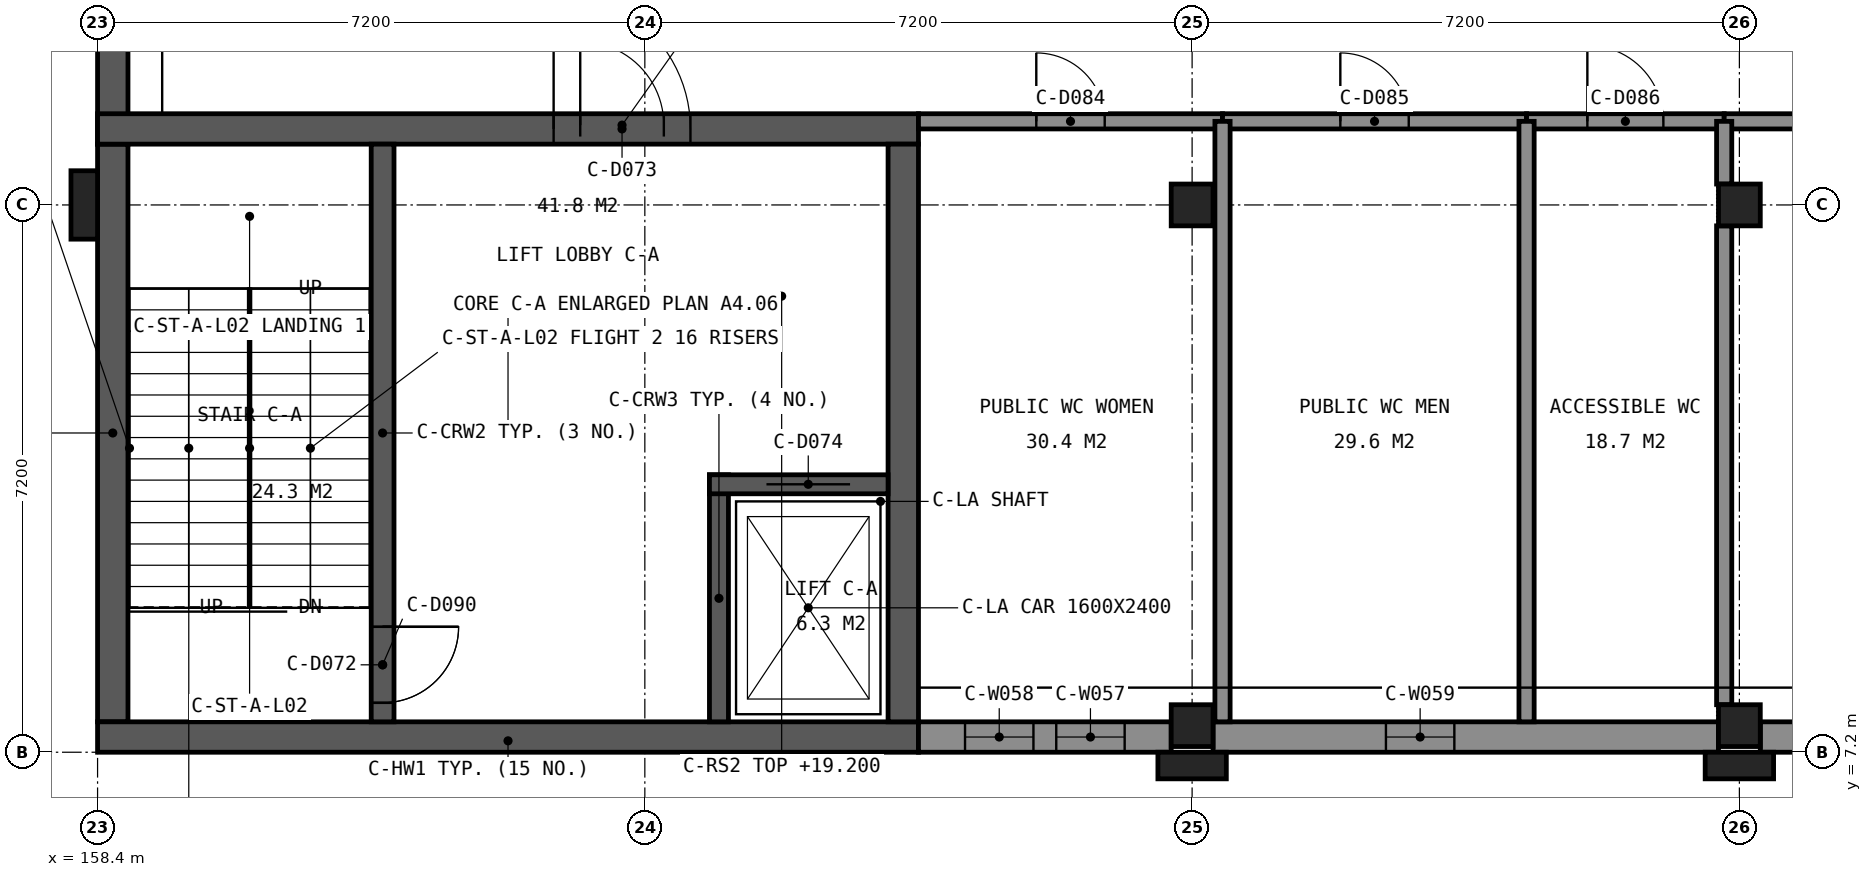
"""IFC4 building model, lengths in metres.
Left out: names, types, materials, properties, quantities, classifications, styles, units other than length and angle.
Written with IfcOpenShell. Run it as: python <this file> out.ifc"""

import sys

from ifc_helpers import new_model, si_unit, direction, frame, frame_2d, origin, origin_2d, place, context, subcontext, project, spatial, polyline, rectangle, outline, extrude, element, fill, save


model = new_model("IFC4")
c1 = context("Model", 3, precision=1e-05, world=origin(), true_north=direction((0.0, 1.0)))
c2 = subcontext(c1, "Body", "Model", "MODEL_VIEW")
j1 = project(units=[si_unit("LENGTHUNIT", "METRE"), si_unit("PLANEANGLEUNIT", "RADIAN")], contexts=[c1])
p1 = place(None, origin())
s1 = spatial("IfcSite", under=j1, at=p1, CompositionType="ELEMENT")
p2 = place(p1, origin())
s2 = spatial("IfcBuilding", under=s1, at=p2, CompositionType="ELEMENT")
p3 = place(p2, frame((0.0, 0.0, 14.4)))
s3 = spatial("IfcBuildingStorey", under=s2, at=p3, CompositionType="ELEMENT", Elevation=14.4)
for number, where, z_axis, x_axis in (
    (1, (172.8, 14.4, 0.0), (0.0, 0.0, 1.0), (1.0, 0.0, 0.0)),
    (2, (180.0, 14.4, 0.0), (0.0, 0.0, 1.0), (1.0, 0.0, 0.0)),
    (3, (172.8, 7.55, 0.0), (0.0, 0.0, 1.0), (1.0, 0.0, 0.0)),
    (4, (180.0, 7.55, 0.0), (0.0, 0.0, 1.0), (1.0, 0.0, 0.0)),
):
    element("IfcColumn", number, at=place(p3, frame(where, z_axis=z_axis, x_axis=x_axis)), inside=s3, PredefinedType="COLUMN", context=c2, shape_type="SweptSolid", body=[
        extrude(rectangle(XDim=0.55, YDim=0.55, at=origin_2d()), origin(), (0.0, 0.0, 1.0), 4.8),
    ])
p4 = place(p3, frame((158.6, 15.2, 0.0), z_axis=(0.0, 0.0, 1.0), x_axis=(0.0, 1.0, 0.0)))
e5 = element("IfcWall", 5, at=p4, inside=s3, PredefinedType="SHEAR", context=c2, shape_type="SweptSolid", body=[
    extrude(rectangle(XDim=6.125, YDim=0.4, at=frame_2d((3.062, 0.0))), origin(), (0.0, 0.0, 1.0), 3.7),
])
p5 = place(p4, frame((2.012, 0.0, 1.8)))
e6 = element("IfcOpeningElement", 6, at=p5, cuts=e5, PredefinedType="OPENING", context=c2, shape_type="SweptSolid", body=[
    extrude(rectangle(XDim=0.9, YDim=1.2, at=frame_2d((0.45, 0.6))), frame((0.0, 0.21, 0.0), z_axis=(0.0, -1.0, 0.0), x_axis=(1.0, 0.0, 0.0)), (0.0, 0.0, 1.0), 0.42),
])
p6 = place(p3, frame((158.6, 7.6, 0.0), z_axis=(0.0, 0.0, 1.0), x_axis=(0.0, 1.0, 0.0)))
e7 = element("IfcWall", 7, at=p6, inside=s3, PredefinedType="SHEAR", context=c2, shape_type="SweptSolid", body=[
    extrude(rectangle(XDim=7.6, YDim=0.4, at=frame_2d((3.8, 0.0))), origin(), (0.0, 0.0, 1.0), 4.5),
])
p7 = place(p3, frame((169.2, 7.4, 0.0), z_axis=(0.0, 0.0, 1.0), x_axis=(-1.0, 0.0, 0.0)))
e8 = element("IfcWall", 8, at=p7, inside=s3, PredefinedType="SHEAR", context=c2, shape_type="SweptSolid", body=[
    extrude(rectangle(XDim=10.8, YDim=0.4, at=frame_2d((5.4, 0.0))), origin(), (0.0, 0.0, 1.0), 4.5),
])
p8 = place(p3, frame((172.525, 7.4, 0.0), z_axis=(0.0, 0.0, 1.0), x_axis=(-1.0, 0.0, 0.0)))
e9 = element("IfcWall", 9, at=p8, inside=s3, PredefinedType="SOLIDWALL", context=c2, shape_type="SweptSolid", body=[
    extrude(rectangle(XDim=3.325, YDim=0.4, at=frame_2d((1.663, 0.0))), origin(), (0.0, 0.0, 1.0), 3.7),
])
p9 = place(p8, frame((0.613, 0.0, 1.8)))
e10 = element("IfcOpeningElement", 10, at=p9, cuts=e9, PredefinedType="OPENING", context=c2, shape_type="SweptSolid", body=[
    extrude(rectangle(XDim=0.9, YDim=1.2, at=frame_2d((0.45, 0.6))), frame((0.0, 0.21, 0.0), z_axis=(0.0, -1.0, 0.0), x_axis=(1.0, 0.0, 0.0)), (0.0, 0.0, 1.0), 0.42),
])
p10 = place(p8, frame((1.812, 0.0, 1.8)))
e11 = element("IfcOpeningElement", 11, at=p10, cuts=e9, PredefinedType="OPENING", context=c2, shape_type="SweptSolid", body=[
    extrude(rectangle(XDim=0.9, YDim=1.2, at=frame_2d((0.45, 0.6))), frame((0.0, 0.21, 0.0), z_axis=(0.0, -1.0, 0.0), x_axis=(1.0, 0.0, 0.0)), (0.0, 0.0, 1.0), 0.42),
])
p11 = place(p3, frame((179.725, 7.4, 0.0), z_axis=(0.0, 0.0, 1.0), x_axis=(-1.0, 0.0, 0.0)))
e12 = element("IfcWall", 12, at=p11, inside=s3, PredefinedType="SOLIDWALL", context=c2, shape_type="SweptSolid", body=[
    extrude(rectangle(XDim=6.65, YDim=0.4, at=frame_2d((3.325, 0.0))), origin(), (0.0, 0.0, 1.0), 3.7),
])
p12 = place(p11, frame((3.475, 0.0, 1.8)))
e13 = element("IfcOpeningElement", 13, at=p12, cuts=e12, PredefinedType="OPENING", context=c2, shape_type="SweptSolid", body=[
    extrude(rectangle(XDim=0.9, YDim=1.2, at=frame_2d((0.45, 0.6))), frame((0.0, 0.21, 0.0), z_axis=(0.0, -1.0, 0.0), x_axis=(1.0, 0.0, 0.0)), (0.0, 0.0, 1.0), 0.42),
])
p13 = place(p3, frame((186.925, 7.4, 0.0), z_axis=(0.0, 0.0, 1.0), x_axis=(-1.0, 0.0, 0.0)))
e14 = element("IfcWall", 14, at=p13, inside=s3, PredefinedType="SOLIDWALL", context=c2, shape_type="SweptSolid", body=[
    extrude(rectangle(XDim=6.65, YDim=0.4, at=frame_2d((3.325, 0.0))), origin(), (0.0, 0.0, 1.0), 3.7),
])
p14 = place(p13, frame((2.275, 0.0, 1.8)))
e15 = element("IfcOpeningElement", 15, at=p14, cuts=e14, PredefinedType="OPENING", context=c2, shape_type="SweptSolid", body=[
    extrude(rectangle(XDim=0.9, YDim=1.2, at=frame_2d((0.45, 0.6))), frame((0.0, 0.21, 0.0), z_axis=(0.0, -1.0, 0.0), x_axis=(1.0, 0.0, 0.0)), (0.0, 0.0, 1.0), 0.42),
])
p15 = place(p13, frame((3.475, 0.0, 1.8)))
e16 = element("IfcOpeningElement", 16, at=p15, cuts=e14, PredefinedType="OPENING", context=c2, shape_type="SweptSolid", body=[
    extrude(rectangle(XDim=0.9, YDim=1.2, at=frame_2d((0.45, 0.6))), frame((0.0, 0.21, 0.0), z_axis=(0.0, -1.0, 0.0), x_axis=(1.0, 0.0, 0.0)), (0.0, 0.0, 1.0), 0.42),
])
p16 = place(p3, frame((158.4, 15.4, 0.0), z_axis=(0.0, 0.0, 1.0), x_axis=(1.0, 0.0, 0.0)))
e17 = element("IfcWall", 17, at=p16, inside=s3, PredefinedType="SHEAR", context=c2, shape_type="SweptSolid", body=[
    extrude(rectangle(XDim=10.8, YDim=0.4, at=frame_2d((5.4, 0.0))), origin(), (0.0, 0.0, 1.0), 4.5),
])
p17 = place(p16, frame((6.0, 0.0, 0.0)))
e18 = element("IfcOpeningElement", 18, at=p17, cuts=e17, PredefinedType="OPENING", context=c2, shape_type="SweptSolid", body=[
    extrude(rectangle(XDim=1.8, YDim=2.1, at=frame_2d((0.9, 1.05))), frame((0.0, 0.21, 0.0), z_axis=(0.0, -1.0, 0.0), x_axis=(1.0, 0.0, 0.0)), (0.0, 0.0, 1.0), 0.42),
])
p18 = place(p3, frame((169.0, 15.2, 0.0), z_axis=(0.0, 0.0, 1.0), x_axis=(0.0, -1.0, 0.0)))
e19 = element("IfcWall", 19, at=p18, inside=s3, PredefinedType="SHEAR", context=c2, shape_type="SweptSolid", body=[
    extrude(rectangle(XDim=7.6, YDim=0.4, at=frame_2d((3.8, 0.0))), origin(), (0.0, 0.0, 1.0), 4.5),
])
p19 = place(p3, frame((162.15, 15.2, 0.0), z_axis=(0.0, 0.0, 1.0), x_axis=(0.0, -1.0, 0.0)))
e20 = element("IfcWall", 20, at=p19, inside=s3, PredefinedType="SHEAR", context=c2, shape_type="SweptSolid", body=[
    extrude(rectangle(XDim=7.6, YDim=0.3, at=frame_2d((3.8, 0.0))), origin(), (0.0, 0.0, 1.0), 4.5),
])
p20 = place(p19, frame((6.35, 0.0, 0.0)))
e21 = element("IfcOpeningElement", 21, at=p20, cuts=e20, PredefinedType="OPENING", context=c2, shape_type="SweptSolid", body=[
    extrude(rectangle(XDim=1.0, YDim=2.1, at=frame_2d((0.5, 1.05))), frame((0.0, 0.16, 0.0), z_axis=(0.0, -1.0, 0.0), x_axis=(1.0, 0.0, 0.0)), (0.0, 0.0, 1.0), 0.32),
])
p21 = place(p3, frame((166.575, 10.85, 0.0), z_axis=(0.0, 0.0, 1.0), x_axis=(0.0, -1.0, 0.0)))
e22 = element("IfcWall", 22, at=p21, inside=s3, PredefinedType="SHEAR", context=c2, shape_type="SweptSolid", body=[
    extrude(rectangle(XDim=3.25, YDim=0.25, at=frame_2d((1.625, 0.0))), origin(), (0.0, 0.0, 1.0), 4.5),
])
p22 = place(p3, frame((166.45, 10.725, 0.0), z_axis=(0.0, 0.0, 1.0), x_axis=(1.0, 0.0, 0.0)))
e23 = element("IfcWall", 23, at=p22, inside=s3, PredefinedType="SHEAR", context=c2, shape_type="SweptSolid", body=[
    extrude(rectangle(XDim=2.35, YDim=0.25, at=frame_2d((1.175, 0.0))), origin(), (0.0, 0.0, 1.0), 4.5),
])
p23 = place(p22, frame((0.75, 0.0, 0.0)))
e24 = element("IfcOpeningElement", 24, at=p23, cuts=e23, PredefinedType="OPENING", context=c2, shape_type="SweptSolid", body=[
    extrude(rectangle(XDim=1.1, YDim=2.1, at=frame_2d((0.55, 1.05))), frame((0.0, 0.135, 0.0), z_axis=(0.0, -1.0, 0.0), x_axis=(1.0, 0.0, 0.0)), (0.0, 0.0, 1.0), 0.27),
])
p24 = place(p3, frame((158.6, 15.6, 4.8), z_axis=(0.0, 0.0, 1.0), x_axis=(0.0, 1.0, 0.0)))
e25 = element("IfcWall", 25, at=p24, inside=s3, PredefinedType="PARAPET", context=c2, shape_type="SweptSolid", body=[
    extrude(rectangle(XDim=2.2, YDim=0.4, at=frame_2d((1.1, 0.0))), origin(), (0.0, 0.0, 1.0), 0.4),
])
p25 = place(p3, frame((188.4, 7.4, 4.8), z_axis=(0.0, 0.0, 1.0), x_axis=(-1.0, 0.0, 0.0)))
e26 = element("IfcWall", 26, at=p25, inside=s3, PredefinedType="PARAPET", context=c2, shape_type="SweptSolid", body=[
    extrude(rectangle(XDim=19.2, YDim=0.4, at=frame_2d((9.6, 0.0))), origin(), (0.0, 0.0, 1.0), 0.4),
])
p26 = place(p3, frame((158.4, 15.45, 4.8), z_axis=(0.0, 0.0, 1.0), x_axis=(1.0, 0.0, 0.0)))
e27 = element("IfcWall", 27, at=p26, inside=s3, PredefinedType="SOLIDWALL", context=c2, shape_type="SweptSolid", body=[
    extrude(outline(polyline([(0.0, 0.0), (10.8, 0.0), (10.8, 2.15), (5.4, 2.45), (0.0, 2.15), (0.0, 0.0)])), frame((0.0, 0.15, 0.0), z_axis=(0.0, -1.0, 0.0), x_axis=(1.0, 0.0, 0.0)), (0.0, 0.0, 1.0), 0.3),
])
p27 = place(p26, frame((6.35, 0.0, 0.0)))
e28 = element("IfcOpeningElement", 28, at=p27, cuts=e27, PredefinedType="OPENING", context=c2, shape_type="SweptSolid", body=[
    extrude(rectangle(XDim=1.1, YDim=2.1, at=frame_2d((0.55, 1.05))), frame((0.0, 0.16, 0.0), z_axis=(0.0, -1.0, 0.0), x_axis=(1.0, 0.0, 0.0)), (0.0, 0.0, 1.0), 0.32),
])
p28 = place(p3, frame((158.4, 7.35, 4.8), z_axis=(0.0, 0.0, 1.0), x_axis=(1.0, 0.0, 0.0)))
e29 = element("IfcWall", 29, at=p28, inside=s3, PredefinedType="SOLIDWALL", context=c2, shape_type="SweptSolid", body=[
    extrude(outline(polyline([(0.0, 0.0), (10.8, 0.0), (10.8, 2.15), (5.4, 2.45), (0.0, 2.15), (0.0, 0.0)])), frame((0.0, 0.15, 0.0), z_axis=(0.0, -1.0, 0.0), x_axis=(1.0, 0.0, 0.0)), (0.0, 0.0, 1.0), 0.3),
])
for number, where, z_axis, x_axis in (
    (30, (158.55, 15.3, 4.8), (0.0, 0.0, 1.0), (0.0, -1.0, 0.0)),
    (31, (169.05, 15.3, 4.8), (0.0, 0.0, 1.0), (0.0, -1.0, 0.0)),
):
    element("IfcWall", number, at=place(p3, frame(where, z_axis=z_axis, x_axis=x_axis)), inside=s3, PredefinedType="SOLIDWALL", context=c2, shape_type="SweptSolid", body=[
        extrude(rectangle(XDim=7.8, YDim=0.3, at=frame_2d((3.9, 0.0))), origin(), (0.0, 0.0, 1.0), 2.15),
    ])
p29 = place(p3, frame((162.15, 15.3, 4.8), z_axis=(0.0, 0.0, 1.0), x_axis=(0.0, -1.0, 0.0)))
e32 = element("IfcWall", 32, at=p29, inside=s3, PredefinedType="SOLIDWALL", context=c2, shape_type="SweptSolid", body=[
    extrude(rectangle(XDim=7.8, YDim=0.3, at=frame_2d((3.9, 0.0))), origin(), (0.0, 0.0, 1.0), 2.15),
])
p30 = place(p29, frame((6.45, 0.0, 0.0)))
e33 = element("IfcOpeningElement", 33, at=p30, cuts=e32, PredefinedType="OPENING", context=c2, shape_type="SweptSolid", body=[
    extrude(rectangle(XDim=1.0, YDim=2.1, at=frame_2d((0.5, 1.05))), frame((0.0, 0.16, 0.0), z_axis=(0.0, -1.0, 0.0), x_axis=(1.0, 0.0, 0.0)), (0.0, 0.0, 1.0), 0.32),
])
for number, where, z_axis, x_axis in (
    (34, (172.8, 7.025, 0.0), (0.0, 0.0, 1.0), (1.0, 0.0, 0.0)),
    (35, (180.0, 7.025, 0.0), (0.0, 0.0, 1.0), (1.0, 0.0, 0.0)),
    (36, (158.225, 14.4, 0.0), (0.0, 0.0, 1.0), (0.0, 1.0, 0.0)),
):
    element("IfcColumn", number, at=place(p3, frame(where, z_axis=z_axis, x_axis=x_axis)), inside=s3, PredefinedType="PILASTER", context=c2, shape_type="SweptSolid", body=[
        extrude(rectangle(XDim=0.9, YDim=0.35, at=origin_2d()), origin(), (0.0, 0.0, 1.0), 3.9),
    ])
p31 = place(p3, frame((230.4, 6.575, 4.5), z_axis=(0.0, 0.0, 1.0), x_axis=(-1.0, 0.0, 0.0)))
e37 = element("IfcWall", 37, at=p31, inside=s3, PredefinedType="SOLIDWALL", context=c2, shape_type="SweptSolid", body=[
    extrude(rectangle(XDim=72.75, YDim=0.25, at=frame_2d((36.375, 0.0))), origin(), (0.0, 0.0, 1.0), 0.65),
])
p32 = place(p3, frame((157.775, 7.2, 4.5), z_axis=(0.0, 0.0, 1.0), x_axis=(0.0, 1.0, 0.0)))
e38 = element("IfcWall", 38, at=p32, inside=s3, PredefinedType="SOLIDWALL", context=c2, shape_type="SweptSolid", body=[
    extrude(rectangle(XDim=21.6, YDim=0.25, at=frame_2d((10.8, 0.0))), origin(), (0.0, 0.0, 1.0), 0.65),
])
p33 = place(p3, frame((169.2, 15.5, 0.0), z_axis=(0.0, 0.0, 1.0), x_axis=(1.0, 0.0, 0.0)))
e39 = element("IfcWall", 39, at=p33, inside=s3, PredefinedType="PARTITIONING", context=c2, shape_type="SweptSolid", body=[
    extrude(rectangle(XDim=4.0, YDim=0.2, at=frame_2d((2.0, 0.0))), origin(), (0.0, 0.0, 1.0), 3.7),
])
p34 = place(p33, frame((1.55, 0.0, 0.0)))
e40 = element("IfcOpeningElement", 40, at=p34, cuts=e39, PredefinedType="OPENING", context=c2, shape_type="SweptSolid", body=[
    extrude(rectangle(XDim=0.9, YDim=2.1, at=frame_2d((0.45, 1.05))), frame((0.0, 0.11, 0.0), z_axis=(0.0, -1.0, 0.0), x_axis=(1.0, 0.0, 0.0)), (0.0, 0.0, 1.0), 0.22),
])
p35 = place(p3, frame((173.2, 15.5, 0.0), z_axis=(0.0, 0.0, 1.0), x_axis=(1.0, 0.0, 0.0)))
e41 = element("IfcWall", 41, at=p35, inside=s3, PredefinedType="PARTITIONING", context=c2, shape_type="SweptSolid", body=[
    extrude(rectangle(XDim=4.0, YDim=0.2, at=frame_2d((2.0, 0.0))), origin(), (0.0, 0.0, 1.0), 3.7),
])
p36 = place(p35, frame((1.55, 0.0, 0.0)))
e42 = element("IfcOpeningElement", 42, at=p36, cuts=e41, PredefinedType="OPENING", context=c2, shape_type="SweptSolid", body=[
    extrude(rectangle(XDim=0.9, YDim=2.1, at=frame_2d((0.45, 1.05))), frame((0.0, 0.11, 0.0), z_axis=(0.0, -1.0, 0.0), x_axis=(1.0, 0.0, 0.0)), (0.0, 0.0, 1.0), 0.22),
])
p37 = place(p3, frame((177.2, 15.5, 0.0), z_axis=(0.0, 0.0, 1.0), x_axis=(1.0, 0.0, 0.0)))
e43 = element("IfcWall", 43, at=p37, inside=s3, PredefinedType="PARTITIONING", context=c2, shape_type="SweptSolid", body=[
    extrude(rectangle(XDim=2.6, YDim=0.2, at=frame_2d((1.3, 0.0))), origin(), (0.0, 0.0, 1.0), 3.7),
])
p38 = place(p37, frame((0.8, 0.0, 0.0)))
e44 = element("IfcOpeningElement", 44, at=p38, cuts=e43, PredefinedType="OPENING", context=c2, shape_type="SweptSolid", body=[
    extrude(rectangle(XDim=1.0, YDim=2.1, at=frame_2d((0.5, 1.05))), frame((0.0, 0.11, 0.0), z_axis=(0.0, -1.0, 0.0), x_axis=(1.0, 0.0, 0.0)), (0.0, 0.0, 1.0), 0.22),
])
p39 = place(p3, frame((179.8, 15.5, 0.0), z_axis=(0.0, 0.0, 1.0), x_axis=(1.0, 0.0, 0.0)))
e45 = element("IfcWall", 45, at=p39, inside=s3, PredefinedType="PARTITIONING", context=c2, shape_type="SweptSolid", body=[
    extrude(rectangle(XDim=8.6, YDim=0.2, at=frame_2d((4.3, 0.0))), origin(), (0.0, 0.0, 1.0), 3.7),
])
p40 = place(p39, frame((3.8, 0.0, 0.0)))
e46 = element("IfcOpeningElement", 46, at=p40, cuts=e45, PredefinedType="OPENING", context=c2, shape_type="SweptSolid", body=[
    extrude(rectangle(XDim=1.0, YDim=2.1, at=frame_2d((0.5, 1.05))), frame((0.0, 0.11, 0.0), z_axis=(0.0, -1.0, 0.0), x_axis=(1.0, 0.0, 0.0)), (0.0, 0.0, 1.0), 0.22),
])
for number, where, z_axis, x_axis in (
    (47, (173.2, 15.5, 0.0), (0.0, 0.0, 1.0), (0.0, -1.0, 0.0)),
    (48, (177.2, 15.5, 0.0), (0.0, 0.0, 1.0), (0.0, -1.0, 0.0)),
):
    element("IfcWall", number, at=place(p3, frame(where, z_axis=z_axis, x_axis=x_axis)), inside=s3, PredefinedType="PARTITIONING", context=c2, shape_type="SweptSolid", body=[
        extrude(rectangle(XDim=7.9, YDim=0.2, at=frame_2d((3.95, 0.0))), origin(), (0.0, 0.0, 1.0), 3.7),
    ])
p41 = place(p3, frame((179.8, 15.5, 0.0), z_axis=(0.0, 0.0, 1.0), x_axis=(0.0, -1.0, 0.0)))
e49 = element("IfcWall", 49, at=p41, inside=s3, PredefinedType="PARTITIONING", context=c2, shape_type="SweptSolid", body=[
    extrude(rectangle(XDim=0.825, YDim=0.2, at=frame_2d((0.413, 0.0))), origin(), (0.0, 0.0, 1.0), 3.7),
])
p42 = place(p3, frame((179.8, 14.125, 0.0), z_axis=(0.0, 0.0, 1.0), x_axis=(0.0, -1.0, 0.0)))
e50 = element("IfcWall", 50, at=p42, inside=s3, PredefinedType="PARTITIONING", context=c2, shape_type="SweptSolid", body=[
    extrude(rectangle(XDim=6.3, YDim=0.2, at=frame_2d((3.15, 0.0))), origin(), (0.0, 0.0, 1.0), 3.7),
])
p43 = place(p9, origin())
e51 = element("IfcWindow", 51, at=p43, inside=s3, PartitioningType="SINGLE_PANEL", PredefinedType="WINDOW", context=c2, shape_type="SweptSolid", body=[
    extrude(rectangle(XDim=0.9, YDim=1.2, at=frame_2d((0.45, 0.6))), frame((0.0, -0.09, 0.0), z_axis=(0.0, -1.0, 0.0), x_axis=(1.0, 0.0, 0.0)), (0.0, 0.0, 1.0), 0.06),
])
fill(e10, e51)
p44 = place(p10, origin())
e52 = element("IfcWindow", 52, at=p44, inside=s3, PartitioningType="SINGLE_PANEL", PredefinedType="WINDOW", context=c2, shape_type="SweptSolid", body=[
    extrude(rectangle(XDim=0.9, YDim=1.2, at=frame_2d((0.45, 0.6))), frame((0.0, -0.09, 0.0), z_axis=(0.0, -1.0, 0.0), x_axis=(1.0, 0.0, 0.0)), (0.0, 0.0, 1.0), 0.06),
])
fill(e11, e52)
p45 = place(p12, origin())
e53 = element("IfcWindow", 53, at=p45, inside=s3, PartitioningType="SINGLE_PANEL", PredefinedType="WINDOW", context=c2, shape_type="SweptSolid", body=[
    extrude(rectangle(XDim=0.9, YDim=1.2, at=frame_2d((0.45, 0.6))), frame((0.0, -0.09, 0.0), z_axis=(0.0, -1.0, 0.0), x_axis=(1.0, 0.0, 0.0)), (0.0, 0.0, 1.0), 0.06),
])
fill(e13, e53)
p46 = place(p20, origin())
e54 = element("IfcDoor", 54, at=p46, inside=s3, OperationType="NOTDEFINED", PredefinedType="DOOR", context=c2, shape_type="SweptSolid", body=[
    extrude(rectangle(XDim=1.0, YDim=2.1, at=frame_2d((0.5, 1.05))), frame((0.0, 0.025, 0.0), z_axis=(0.0, -1.0, 0.0), x_axis=(1.0, 0.0, 0.0)), (0.0, 0.0, 1.0), 0.05),
])
fill(e21, e54)
p47 = place(p17, origin())
e55 = element("IfcDoor", 55, at=p47, inside=s3, OperationType="NOTDEFINED", PredefinedType="DOOR", context=c2, shape_type="SweptSolid", body=[
    extrude(rectangle(XDim=1.8, YDim=2.1, at=frame_2d((0.9, 1.05))), frame((0.0, 0.025, 0.0), z_axis=(0.0, -1.0, 0.0), x_axis=(1.0, 0.0, 0.0)), (0.0, 0.0, 1.0), 0.05),
])
fill(e18, e55)
p48 = place(p23, origin())
e56 = element("IfcDoor", 56, at=p48, inside=s3, OperationType="SLIDING_TO_LEFT", PredefinedType="DOOR", context=c2, shape_type="SweptSolid", body=[
    extrude(rectangle(XDim=1.1, YDim=2.1, at=frame_2d((0.55, 1.05))), frame((0.0, 0.025, 0.0), z_axis=(0.0, -1.0, 0.0), x_axis=(1.0, 0.0, 0.0)), (0.0, 0.0, 1.0), 0.05),
])
fill(e24, e56)
p49 = place(p34, origin())
e57 = element("IfcDoor", 57, at=p49, inside=s3, OperationType="NOTDEFINED", PredefinedType="DOOR", context=c2, shape_type="SweptSolid", body=[
    extrude(rectangle(XDim=0.9, YDim=2.1, at=frame_2d((0.45, 1.05))), frame((0.0, 0.025, 0.0), z_axis=(0.0, -1.0, 0.0), x_axis=(1.0, 0.0, 0.0)), (0.0, 0.0, 1.0), 0.05),
])
fill(e40, e57)
p50 = place(p36, origin())
e58 = element("IfcDoor", 58, at=p50, inside=s3, OperationType="NOTDEFINED", PredefinedType="DOOR", context=c2, shape_type="SweptSolid", body=[
    extrude(rectangle(XDim=0.9, YDim=2.1, at=frame_2d((0.45, 1.05))), frame((0.0, 0.025, 0.0), z_axis=(0.0, -1.0, 0.0), x_axis=(1.0, 0.0, 0.0)), (0.0, 0.0, 1.0), 0.05),
])
fill(e42, e58)
p51 = place(p38, origin())
e59 = element("IfcDoor", 59, at=p51, inside=s3, OperationType="NOTDEFINED", PredefinedType="DOOR", context=c2, shape_type="SweptSolid", body=[
    extrude(rectangle(XDim=1.0, YDim=2.1, at=frame_2d((0.5, 1.05))), frame((0.0, 0.025, 0.0), z_axis=(0.0, -1.0, 0.0), x_axis=(1.0, 0.0, 0.0)), (0.0, 0.0, 1.0), 0.05),
])
fill(e44, e59)
p52 = place(p30, origin())
e60 = element("IfcDoor", 60, at=p52, inside=s3, OperationType="NOTDEFINED", PredefinedType="DOOR", context=c2, shape_type="SweptSolid", body=[
    extrude(rectangle(XDim=1.0, YDim=2.1, at=frame_2d((0.5, 1.05))), frame((0.0, 0.025, 0.0), z_axis=(0.0, -1.0, 0.0), x_axis=(1.0, 0.0, 0.0)), (0.0, 0.0, 1.0), 0.05),
])
fill(e33, e60)
p53 = place(p27, origin())
e61 = element("IfcDoor", 61, at=p53, inside=s3, OperationType="NOTDEFINED", PredefinedType="DOOR", context=c2, shape_type="SweptSolid", body=[
    extrude(rectangle(XDim=1.1, YDim=2.1, at=frame_2d((0.55, 1.05))), frame((0.0, 0.025, 0.0), z_axis=(0.0, -1.0, 0.0), x_axis=(1.0, 0.0, 0.0)), (0.0, 0.0, 1.0), 0.05),
])
fill(e28, e61)
save(model, sys.argv[1])
